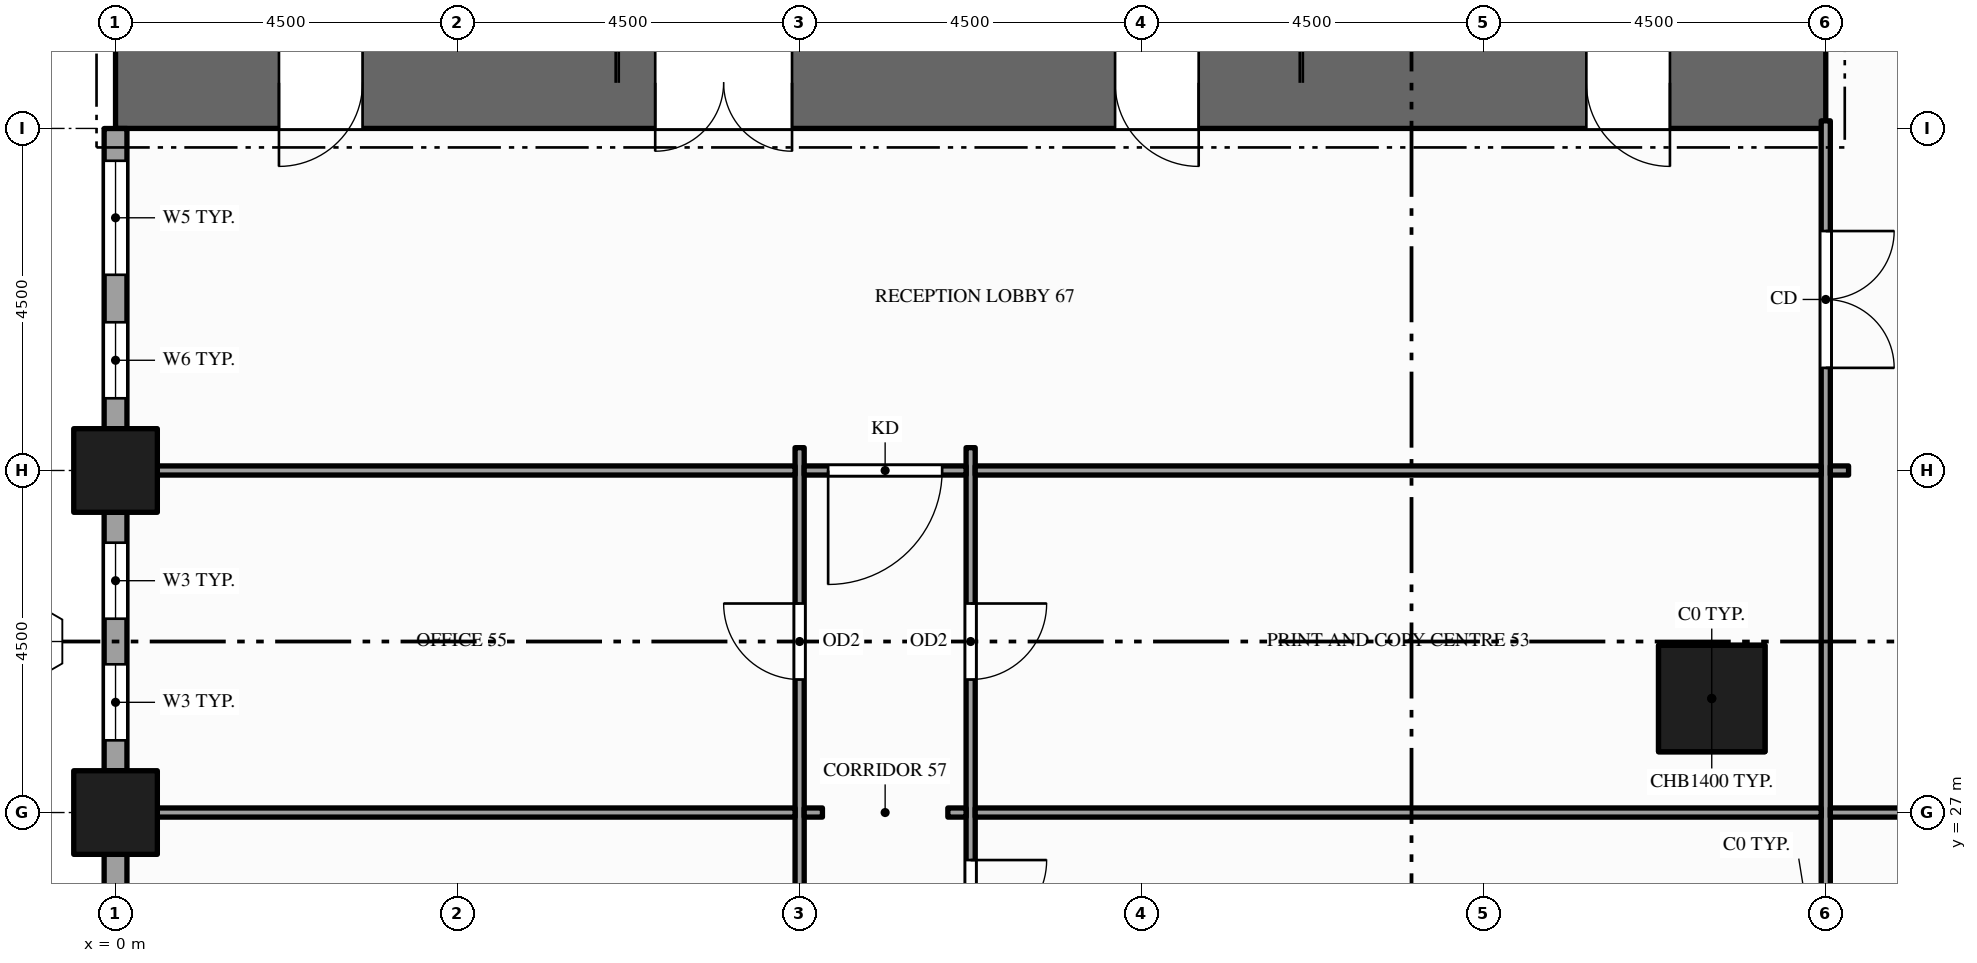
"""IFC4 building model, lengths in metres.
Left out: names, types, materials, properties, quantities, classifications, styles, units other than length and angle.
Written with IfcOpenShell. Run it as: python <this file> out.ifc"""

import sys

from ifc_helpers import new_model, si_unit, direction, frame, frame_2d, origin, origin_2d, place, context, subcontext, project, spatial, rectangle, hollow_rectangle, extrude, element, fill, save


model = new_model("IFC4")
c1 = context("Model", 3, precision=1e-05, world=origin(), true_north=direction((0.0, 1.0)))
c2 = subcontext(c1, "Body", "Model", "MODEL_VIEW")
j1 = project(units=[si_unit("LENGTHUNIT", "METRE"), si_unit("PLANEANGLEUNIT", "RADIAN")], contexts=[c1])
p1 = place(None, origin())
s1 = spatial("IfcSite", under=j1, at=p1, CompositionType="ELEMENT")
p2 = place(p1, origin())
s2 = spatial("IfcBuilding", under=s1, at=p2, CompositionType="ELEMENT")
p3 = place(p2, frame((0.0, 0.0, 24.0)))
s3 = spatial("IfcBuildingStorey", under=s2, at=p3, CompositionType="ELEMENT", Elevation=24.0)
p4 = place(p3, frame((0.0, 36.6, -0.15), z_axis=(0.0, 0.0, 1.0), x_axis=(1.0, 0.0, 0.0)))
e1 = element("IfcWall", 1, at=p4, inside=s3, PredefinedType="SHEAR", context=c2, shape_type="SweptSolid", body=[
    extrude(rectangle(XDim=22.5, YDim=1.2, at=frame_2d((11.25, 0.0))), origin(), (0.0, 0.0, 1.0), 5.0),
])
p5 = place(p4, frame((7.1, 0.0, 0.15)))
e2 = element("IfcOpeningElement", 2, at=p5, cuts=e1, PredefinedType="OPENING", context=c2, shape_type="SweptSolid", body=[
    extrude(rectangle(XDim=1.8, YDim=2.1, at=frame_2d((0.9, 1.05))), frame((0.0, 0.61, 0.0), z_axis=(0.0, -1.0, 0.0), x_axis=(1.0, 0.0, 0.0)), (0.0, 0.0, 1.0), 1.22),
])
p6 = place(p4, frame((13.15, 0.0, 0.15)))
e3 = element("IfcOpeningElement", 3, at=p6, cuts=e1, PredefinedType="OPENING", context=c2, shape_type="SweptSolid", body=[
    extrude(rectangle(XDim=1.1, YDim=2.1, at=frame_2d((0.55, 1.05))), frame((0.0, 0.61, 0.0), z_axis=(0.0, -1.0, 0.0), x_axis=(1.0, 0.0, 0.0)), (0.0, 0.0, 1.0), 1.22),
])
p7 = place(p4, frame((2.15, 0.0, 0.15)))
e4 = element("IfcOpeningElement", 4, at=p7, cuts=e1, PredefinedType="OPENING", context=c2, shape_type="SweptSolid", body=[
    extrude(rectangle(XDim=1.1, YDim=2.1, at=frame_2d((0.55, 1.05))), frame((0.0, 0.61, 0.0), z_axis=(0.0, -1.0, 0.0), x_axis=(1.0, 0.0, 0.0)), (0.0, 0.0, 1.0), 1.22),
])
p8 = place(p4, frame((19.35, 0.0, 0.15)))
e5 = element("IfcOpeningElement", 5, at=p8, cuts=e1, PredefinedType="OPENING", context=c2, shape_type="SweptSolid", body=[
    extrude(rectangle(XDim=1.1, YDim=2.1, at=frame_2d((0.55, 1.05))), frame((0.0, 0.61, 0.0), z_axis=(0.0, -1.0, 0.0), x_axis=(1.0, 0.0, 0.0)), (0.0, 0.0, 1.0), 1.22),
])
for number, where, z_axis, x_axis in (
    (6, (0.0, 27.0, -0.25), (0.0, 0.0, 1.0), (1.0, 0.0, 0.0)),
    (7, (0.0, 31.5, -0.25), (0.0, 0.0, 1.0), (1.0, 0.0, 0.0)),
):
    element("IfcColumn", number, at=place(p3, frame(where, z_axis=z_axis, x_axis=x_axis)), inside=s3, PredefinedType="COLUMN", context=c2, shape_type="SweptSolid", body=[
        extrude(hollow_rectangle(XDim=1.1, YDim=1.1, WallThickness=0.06, at=origin_2d()), origin(), (0.0, 0.0, 1.0), 5.1),
    ])
p9 = place(p3, frame((21.0, 28.5, -0.25), z_axis=(0.0, 0.0, 1.0), x_axis=(1.0, 0.0, 0.0)))
e8 = element("IfcColumn", 8, at=p9, inside=s3, PredefinedType="COLUMN", context=c2, shape_type="SweptSolid", body=[
    extrude(hollow_rectangle(XDim=1.4, YDim=1.4, WallThickness=0.08, at=origin_2d()), origin(), (0.0, 0.0, 1.0), 3.45),
])
p10 = place(p3, frame((21.0, 28.5, 3.2), z_axis=(0.0, 0.0, 1.0), x_axis=(1.0, 0.0, 0.0)))
e9 = element("IfcColumn", 9, at=p10, inside=s3, PredefinedType="COLUMN", context=c2, shape_type="SweptSolid", body=[
    extrude(rectangle(XDim=1.4, YDim=1.4, at=origin_2d()), origin(), (0.0, 0.0, 1.0), 1.5),
])
p11 = place(p3, frame((0.0, 35.999, 0.0), z_axis=(0.0, 0.0, 1.0), x_axis=(0.0, -1.0, 0.0)))
e10 = element("IfcWall", 10, at=p11, inside=s3, PredefinedType="STANDARD", context=c2, shape_type="SweptSolid", body=[
    extrude(rectangle(XDim=3.949, YDim=0.3, at=frame_2d((1.975, 0.0))), origin(), (0.0, 0.0, 1.0), 3.45),
])
p12 = place(p11, frame((0.425, 0.0, 0.9)))
e11 = element("IfcOpeningElement", 11, at=p12, cuts=e10, PredefinedType="OPENING", context=c2, shape_type="SweptSolid", body=[
    extrude(rectangle(XDim=1.5, YDim=2.25, at=frame_2d((0.75, 1.125))), frame((0.0, 0.16, 0.0), z_axis=(0.0, -1.0, 0.0), x_axis=(1.0, 0.0, 0.0)), (0.0, 0.0, 1.0), 0.32),
])
p13 = place(p11, frame((2.549, 0.0, 0.9)))
e12 = element("IfcOpeningElement", 12, at=p13, cuts=e10, PredefinedType="OPENING", context=c2, shape_type="SweptSolid", body=[
    extrude(rectangle(XDim=1.0, YDim=2.25, at=frame_2d((0.5, 1.125))), frame((0.0, 0.16, 0.0), z_axis=(0.0, -1.0, 0.0), x_axis=(1.0, 0.0, 0.0)), (0.0, 0.0, 1.0), 0.32),
])
p14 = place(p3, frame((0.0, 30.95, 0.0), z_axis=(0.0, 0.0, 1.0), x_axis=(0.0, -1.0, 0.0)))
e13 = element("IfcWall", 13, at=p14, inside=s3, PredefinedType="STANDARD", context=c2, shape_type="SweptSolid", body=[
    extrude(rectangle(XDim=3.4, YDim=0.3, at=frame_2d((1.7, 0.0))), origin(), (0.0, 0.0, 1.0), 3.938),
])
p15 = place(p14, frame((0.4, 0.0, 0.9)))
e14 = element("IfcOpeningElement", 14, at=p15, cuts=e13, PredefinedType="OPENING", context=c2, shape_type="SweptSolid", body=[
    extrude(rectangle(XDim=1.0, YDim=2.75, at=frame_2d((0.5, 1.375))), frame((0.0, 0.16, 0.0), z_axis=(0.0, -1.0, 0.0), x_axis=(1.0, 0.0, 0.0)), (0.0, 0.0, 1.0), 0.32),
])
p16 = place(p14, frame((2.0, 0.0, 0.9)))
e15 = element("IfcOpeningElement", 15, at=p16, cuts=e13, PredefinedType="OPENING", context=c2, shape_type="SweptSolid", body=[
    extrude(rectangle(XDim=1.0, YDim=2.75, at=frame_2d((0.5, 1.375))), frame((0.0, 0.16, 0.0), z_axis=(0.0, -1.0, 0.0), x_axis=(1.0, 0.0, 0.0)), (0.0, 0.0, 1.0), 0.32),
])
p17 = place(p3, frame((0.0, 26.45, 0.0), z_axis=(0.0, 0.0, 1.0), x_axis=(0.0, -1.0, 0.0)))
e16 = element("IfcWall", 16, at=p17, inside=s3, PredefinedType="STANDARD", context=c2, shape_type="SweptSolid", body=[
    extrude(rectangle(XDim=3.4, YDim=0.3, at=frame_2d((1.7, 0.0))), origin(), (0.0, 0.0, 1.0), 3.938),
])
p18 = place(p17, frame((0.4, 0.0, 0.9)))
e17 = element("IfcOpeningElement", 17, at=p18, cuts=e16, PredefinedType="OPENING", context=c2, shape_type="SweptSolid", body=[
    extrude(rectangle(XDim=1.0, YDim=2.75, at=frame_2d((0.5, 1.375))), frame((0.0, 0.16, 0.0), z_axis=(0.0, -1.0, 0.0), x_axis=(1.0, 0.0, 0.0)), (0.0, 0.0, 1.0), 0.32),
])
p19 = place(p17, frame((2.0, 0.0, 0.9)))
e18 = element("IfcOpeningElement", 18, at=p19, cuts=e16, PredefinedType="OPENING", context=c2, shape_type="SweptSolid", body=[
    extrude(rectangle(XDim=1.0, YDim=2.75, at=frame_2d((0.5, 1.375))), frame((0.0, 0.16, 0.0), z_axis=(0.0, -1.0, 0.0), x_axis=(1.0, 0.0, 0.0)), (0.0, 0.0, 1.0), 0.32),
])
p20 = place(p3, frame((9.0, 10.95, 0.0), z_axis=(0.0, 0.0, 1.0), x_axis=(0.0, 1.0, 0.0)))
e19 = element("IfcWall", 19, at=p20, inside=s3, PredefinedType="PARTITIONING", context=c2, shape_type="SweptSolid", body=[
    extrude(rectangle(XDim=20.85, YDim=0.12, at=frame_2d((10.425, 0.0))), origin(), (0.0, 0.0, 1.0), 3.6),
])
p21 = place(p20, frame((13.3, 0.0, 0.0)))
e20 = element("IfcOpeningElement", 20, at=p21, cuts=e19, PredefinedType="OPENING", context=c2, shape_type="SweptSolid", body=[
    extrude(rectangle(XDim=1.0, YDim=2.1, at=frame_2d((0.5, 1.05))), frame((0.0, 0.07, 0.0), z_axis=(0.0, -1.0, 0.0), x_axis=(1.0, 0.0, 0.0)), (0.0, 0.0, 1.0), 0.14),
])
p22 = place(p20, frame((17.8, 0.0, 0.0)))
e21 = element("IfcOpeningElement", 21, at=p22, cuts=e19, PredefinedType="OPENING", context=c2, shape_type="SweptSolid", body=[
    extrude(rectangle(XDim=1.0, YDim=2.1, at=frame_2d((0.5, 1.05))), frame((0.0, 0.07, 0.0), z_axis=(0.0, -1.0, 0.0), x_axis=(1.0, 0.0, 0.0)), (0.0, 0.0, 1.0), 0.14),
])
p23 = place(p3, frame((11.25, 10.95, 0.0), z_axis=(0.0, 0.0, 1.0), x_axis=(0.0, 1.0, 0.0)))
e22 = element("IfcWall", 22, at=p23, inside=s3, PredefinedType="PARTITIONING", context=c2, shape_type="SweptSolid", body=[
    extrude(rectangle(XDim=20.85, YDim=0.12, at=frame_2d((10.425, 0.0))), origin(), (0.0, 0.0, 1.0), 3.6),
])
p24 = place(p23, frame((5.425, 0.0, 0.0)))
e23 = element("IfcOpeningElement", 23, at=p24, cuts=e22, PredefinedType="OPENING", context=c2, shape_type="SweptSolid", body=[
    extrude(rectangle(XDim=1.0, YDim=2.1, at=frame_2d((0.5, 1.05))), frame((0.0, 0.07, 0.0), z_axis=(0.0, -1.0, 0.0), x_axis=(1.0, 0.0, 0.0)), (0.0, 0.0, 1.0), 0.14),
])
p25 = place(p23, frame((12.175, 0.0, 0.0)))
e24 = element("IfcOpeningElement", 24, at=p25, cuts=e22, PredefinedType="OPENING", context=c2, shape_type="SweptSolid", body=[
    extrude(rectangle(XDim=1.0, YDim=2.1, at=frame_2d((0.5, 1.05))), frame((0.0, 0.07, 0.0), z_axis=(0.0, -1.0, 0.0), x_axis=(1.0, 0.0, 0.0)), (0.0, 0.0, 1.0), 0.14),
])
p26 = place(p23, frame((14.425, 0.0, 0.0)))
e25 = element("IfcOpeningElement", 25, at=p26, cuts=e22, PredefinedType="OPENING", context=c2, shape_type="SweptSolid", body=[
    extrude(rectangle(XDim=1.0, YDim=2.1, at=frame_2d((0.5, 1.05))), frame((0.0, 0.07, 0.0), z_axis=(0.0, -1.0, 0.0), x_axis=(1.0, 0.0, 0.0)), (0.0, 0.0, 1.0), 0.14),
])
p27 = place(p23, frame((17.8, 0.0, 0.0)))
e26 = element("IfcOpeningElement", 26, at=p27, cuts=e22, PredefinedType="OPENING", context=c2, shape_type="SweptSolid", body=[
    extrude(rectangle(XDim=1.0, YDim=2.1, at=frame_2d((0.5, 1.05))), frame((0.0, 0.07, 0.0), z_axis=(0.0, -1.0, 0.0), x_axis=(1.0, 0.0, 0.0)), (0.0, 0.0, 1.0), 0.14),
])
p28 = place(p3, frame((22.5, 0.15, 0.0), z_axis=(0.0, 0.0, 1.0), x_axis=(0.0, 1.0, 0.0)))
e27 = element("IfcWall", 27, at=p28, inside=s3, PredefinedType="PARTITIONING", context=c2, shape_type="SweptSolid", body=[
    extrude(rectangle(XDim=35.95, YDim=0.12, at=frame_2d((17.975, 0.0))), origin(), (0.0, 0.0, 1.0), 3.3),
])
p29 = place(p28, frame((9.225, 0.0, 0.0)))
e28 = element("IfcOpeningElement", 28, at=p29, cuts=e27, PredefinedType="OPENING", context=c2, shape_type="SweptSolid", body=[
    extrude(rectangle(XDim=1.5, YDim=2.1, at=frame_2d((0.75, 1.05))), frame((0.0, 0.07, 0.0), z_axis=(0.0, -1.0, 0.0), x_axis=(1.0, 0.0, 0.0)), (0.0, 0.0, 1.0), 0.14),
])
p30 = place(p28, frame((32.7, 0.0, 0.0)))
e29 = element("IfcOpeningElement", 29, at=p30, cuts=e27, PredefinedType="OPENING", context=c2, shape_type="SweptSolid", body=[
    extrude(rectangle(XDim=1.8, YDim=2.1, at=frame_2d((0.9, 1.05))), frame((0.0, 0.07, 0.0), z_axis=(0.0, -1.0, 0.0), x_axis=(1.0, 0.0, 0.0)), (0.0, 0.0, 1.0), 0.14),
])
p31 = place(p3, frame((0.15, 27.0, 0.0), z_axis=(0.0, 0.0, 1.0), x_axis=(1.0, 0.0, 0.0)))
e30 = element("IfcWall", 30, at=p31, inside=s3, PredefinedType="PARTITIONING", context=c2, shape_type="SweptSolid", body=[
    extrude(rectangle(XDim=8.79, YDim=0.12, at=frame_2d((4.395, 0.0))), origin(), (0.0, 0.0, 1.0), 3.938),
])
for number, where, z_axis, x_axis in (
    (31, (9.06, 27.0, 0.0), (0.0, 0.0, 1.0), (1.0, 0.0, 0.0)),
    (32, (10.95, 27.0, 0.0), (0.0, 0.0, 1.0), (1.0, 0.0, 0.0)),
):
    element("IfcWall", number, at=place(p3, frame(where, z_axis=z_axis, x_axis=x_axis)), inside=s3, PredefinedType="PARTITIONING", context=c2, shape_type="SweptSolid", body=[
        extrude(rectangle(XDim=0.24, YDim=0.12, at=frame_2d((0.12, 0.0))), origin(), (0.0, 0.0, 1.0), 3.938),
    ])
p32 = place(p3, frame((11.31, 27.0, 0.0), z_axis=(0.0, 0.0, 1.0), x_axis=(1.0, 0.0, 0.0)))
e33 = element("IfcWall", 33, at=p32, inside=s3, PredefinedType="PARTITIONING", context=c2, shape_type="SweptSolid", body=[
    extrude(rectangle(XDim=11.13, YDim=0.12, at=frame_2d((5.565, 0.0))), origin(), (0.0, 0.0, 1.0), 3.788),
])
p33 = place(p3, frame((22.56, 27.0, 0.0), z_axis=(0.0, 0.0, 1.0), x_axis=(1.0, 0.0, 0.0)))
e34 = element("IfcWall", 34, at=p33, inside=s3, PredefinedType="PARTITIONING", context=c2, shape_type="SweptSolid", body=[
    extrude(rectangle(XDim=4.38, YDim=0.12, at=frame_2d((2.19, 0.0))), origin(), (0.0, 0.0, 1.0), 3.61),
])
p34 = place(p33, frame((1.29, 0.0, 0.0)))
e35 = element("IfcOpeningElement", 35, at=p34, cuts=e34, PredefinedType="OPENING", context=c2, shape_type="SweptSolid", body=[
    extrude(rectangle(XDim=1.8, YDim=2.1, at=frame_2d((0.9, 1.05))), frame((0.0, 0.07, 0.0), z_axis=(0.0, -1.0, 0.0), x_axis=(1.0, 0.0, 0.0)), (0.0, 0.0, 1.0), 0.14),
])
p35 = place(p3, frame((0.15, 31.5, 0.0), z_axis=(0.0, 0.0, 1.0), x_axis=(1.0, 0.0, 0.0)))
e36 = element("IfcWall", 36, at=p35, inside=s3, PredefinedType="PARTITIONING", context=c2, shape_type="SweptSolid", body=[
    extrude(rectangle(XDim=8.79, YDim=0.12, at=frame_2d((4.395, 0.0))), origin(), (0.0, 0.0, 1.0), 3.938),
])
p36 = place(p3, frame((9.06, 31.5, 0.0), z_axis=(0.0, 0.0, 1.0), x_axis=(1.0, 0.0, 0.0)))
e37 = element("IfcWall", 37, at=p36, inside=s3, PredefinedType="PARTITIONING", context=c2, shape_type="SweptSolid", body=[
    extrude(rectangle(XDim=2.13, YDim=0.12, at=frame_2d((1.065, 0.0))), origin(), (0.0, 0.0, 1.0), 3.938),
])
p37 = place(p36, frame((0.315, 0.0, 0.0)))
e38 = element("IfcOpeningElement", 38, at=p37, cuts=e37, PredefinedType="OPENING", context=c2, shape_type="SweptSolid", body=[
    extrude(rectangle(XDim=1.5, YDim=2.1, at=frame_2d((0.75, 1.05))), frame((0.0, 0.07, 0.0), z_axis=(0.0, -1.0, 0.0), x_axis=(1.0, 0.0, 0.0)), (0.0, 0.0, 1.0), 0.14),
])
p38 = place(p3, frame((11.31, 31.5, 0.0), z_axis=(0.0, 0.0, 1.0), x_axis=(1.0, 0.0, 0.0)))
e39 = element("IfcWall", 39, at=p38, inside=s3, PredefinedType="PARTITIONING", context=c2, shape_type="SweptSolid", body=[
    extrude(rectangle(XDim=11.13, YDim=0.12, at=frame_2d((5.565, 0.0))), origin(), (0.0, 0.0, 1.0), 2.9),
])
p39 = place(p3, frame((22.56, 31.5, 0.0), z_axis=(0.0, 0.0, 1.0), x_axis=(1.0, 0.0, 0.0)))
e40 = element("IfcWall", 40, at=p39, inside=s3, PredefinedType="PARTITIONING", context=c2, shape_type="SweptSolid", body=[
    extrude(rectangle(XDim=0.24, YDim=0.12, at=frame_2d((0.12, 0.0))), origin(), (0.0, 0.0, 1.0), 3.788),
])
p40 = place(p12, origin())
e41 = element("IfcWindow", 41, at=p40, inside=s3, PartitioningType="SINGLE_PANEL", PredefinedType="WINDOW", context=c2, shape_type="SweptSolid", body=[
    extrude(rectangle(XDim=1.5, YDim=2.25, at=frame_2d((0.75, 1.125))), frame((0.0, 0.03, 0.0), z_axis=(0.0, -1.0, 0.0), x_axis=(1.0, 0.0, 0.0)), (0.0, 0.0, 1.0), 0.06),
])
fill(e11, e41)
p41 = place(p13, origin())
e42 = element("IfcWindow", 42, at=p41, inside=s3, PartitioningType="SINGLE_PANEL", PredefinedType="WINDOW", context=c2, shape_type="SweptSolid", body=[
    extrude(rectangle(XDim=1.0, YDim=2.25, at=frame_2d((0.5, 1.125))), frame((0.0, 0.03, 0.0), z_axis=(0.0, -1.0, 0.0), x_axis=(1.0, 0.0, 0.0)), (0.0, 0.0, 1.0), 0.06),
])
fill(e12, e42)
p42 = place(p15, origin())
e43 = element("IfcWindow", 43, at=p42, inside=s3, PartitioningType="SINGLE_PANEL", PredefinedType="WINDOW", context=c2, shape_type="SweptSolid", body=[
    extrude(rectangle(XDim=1.0, YDim=2.75, at=frame_2d((0.5, 1.375))), frame((0.0, 0.03, 0.0), z_axis=(0.0, -1.0, 0.0), x_axis=(1.0, 0.0, 0.0)), (0.0, 0.0, 1.0), 0.06),
])
fill(e14, e43)
p43 = place(p16, origin())
e44 = element("IfcWindow", 44, at=p43, inside=s3, PartitioningType="SINGLE_PANEL", PredefinedType="WINDOW", context=c2, shape_type="SweptSolid", body=[
    extrude(rectangle(XDim=1.0, YDim=2.75, at=frame_2d((0.5, 1.375))), frame((0.0, 0.03, 0.0), z_axis=(0.0, -1.0, 0.0), x_axis=(1.0, 0.0, 0.0)), (0.0, 0.0, 1.0), 0.06),
])
fill(e15, e44)
p44 = place(p5, origin())
e45 = element("IfcDoor", 45, at=p44, inside=s3, OperationType="DOUBLE_DOOR_SINGLE_SWING", PredefinedType="DOOR", context=c2, shape_type="SweptSolid", body=[
    extrude(rectangle(XDim=1.8, YDim=2.1, at=frame_2d((0.9, 1.05))), frame((0.0, 0.025, 0.0), z_axis=(0.0, -1.0, 0.0), x_axis=(1.0, 0.0, 0.0)), (0.0, 0.0, 1.0), 0.05),
])
fill(e2, e45)
p45 = place(p6, origin())
e46 = element("IfcDoor", 46, at=p45, inside=s3, OperationType="SINGLE_SWING_RIGHT", PredefinedType="DOOR", context=c2, shape_type="SweptSolid", body=[
    extrude(rectangle(XDim=1.1, YDim=2.1, at=frame_2d((0.55, 1.05))), frame((0.0, 0.025, 0.0), z_axis=(0.0, -1.0, 0.0), x_axis=(1.0, 0.0, 0.0)), (0.0, 0.0, 1.0), 0.05),
])
fill(e3, e46)
p46 = place(p7, origin())
e47 = element("IfcDoor", 47, at=p46, inside=s3, OperationType="SINGLE_SWING_LEFT", PredefinedType="DOOR", context=c2, shape_type="SweptSolid", body=[
    extrude(rectangle(XDim=1.1, YDim=2.1, at=frame_2d((0.55, 1.05))), frame((0.0, 0.025, 0.0), z_axis=(0.0, -1.0, 0.0), x_axis=(1.0, 0.0, 0.0)), (0.0, 0.0, 1.0), 0.05),
])
fill(e4, e47)
p47 = place(p8, origin())
e48 = element("IfcDoor", 48, at=p47, inside=s3, OperationType="SINGLE_SWING_RIGHT", PredefinedType="DOOR", context=c2, shape_type="SweptSolid", body=[
    extrude(rectangle(XDim=1.1, YDim=2.1, at=frame_2d((0.55, 1.05))), frame((0.0, 0.025, 0.0), z_axis=(0.0, -1.0, 0.0), x_axis=(1.0, 0.0, 0.0)), (0.0, 0.0, 1.0), 0.05),
])
fill(e5, e48)
p48 = place(p37, origin())
e49 = element("IfcDoor", 49, at=p48, inside=s3, OperationType="SINGLE_SWING_LEFT", PredefinedType="DOOR", context=c2, shape_type="SweptSolid", body=[
    extrude(rectangle(XDim=1.5, YDim=2.1, at=frame_2d((0.75, 1.05))), frame((0.0, 0.025, 0.0), z_axis=(0.0, -1.0, 0.0), x_axis=(1.0, 0.0, 0.0)), (0.0, 0.0, 1.0), 0.05),
])
fill(e38, e49)
p49 = place(p22, origin())
e50 = element("IfcDoor", 50, at=p49, inside=s3, OperationType="SINGLE_SWING_RIGHT", PredefinedType="DOOR", context=c2, shape_type="SweptSolid", body=[
    extrude(rectangle(XDim=1.0, YDim=2.1, at=frame_2d((0.5, 1.05))), frame((0.0, 0.025, 0.0), z_axis=(0.0, -1.0, 0.0), x_axis=(1.0, 0.0, 0.0)), (0.0, 0.0, 1.0), 0.05),
])
fill(e21, e50)
p50 = place(p26, origin())
e51 = element("IfcDoor", 51, at=p50, inside=s3, OperationType="SINGLE_SWING_RIGHT", PredefinedType="DOOR", context=c2, shape_type="SweptSolid", body=[
    extrude(rectangle(XDim=1.0, YDim=2.1, at=frame_2d((0.5, 1.05))), frame((0.0, 0.025, 0.0), z_axis=(0.0, -1.0, 0.0), x_axis=(1.0, 0.0, 0.0)), (0.0, 0.0, 1.0), 0.05),
])
fill(e25, e51)
p51 = place(p27, origin())
e52 = element("IfcDoor", 52, at=p51, inside=s3, OperationType="SINGLE_SWING_RIGHT", PredefinedType="DOOR", context=c2, shape_type="SweptSolid", body=[
    extrude(rectangle(XDim=1.0, YDim=2.1, at=frame_2d((0.5, 1.05))), frame((0.0, 0.025, 0.0), z_axis=(0.0, -1.0, 0.0), x_axis=(1.0, 0.0, 0.0)), (0.0, 0.0, 1.0), 0.05),
])
fill(e26, e52)
p52 = place(p30, origin())
e53 = element("IfcDoor", 53, at=p52, inside=s3, OperationType="DOUBLE_DOOR_SINGLE_SWING", PredefinedType="DOOR", context=c2, shape_type="SweptSolid", body=[
    extrude(rectangle(XDim=1.8, YDim=2.1, at=frame_2d((0.9, 1.05))), frame((0.0, 0.025, 0.0), z_axis=(0.0, -1.0, 0.0), x_axis=(1.0, 0.0, 0.0)), (0.0, 0.0, 1.0), 0.05),
])
fill(e29, e53)
save(model, sys.argv[1])
